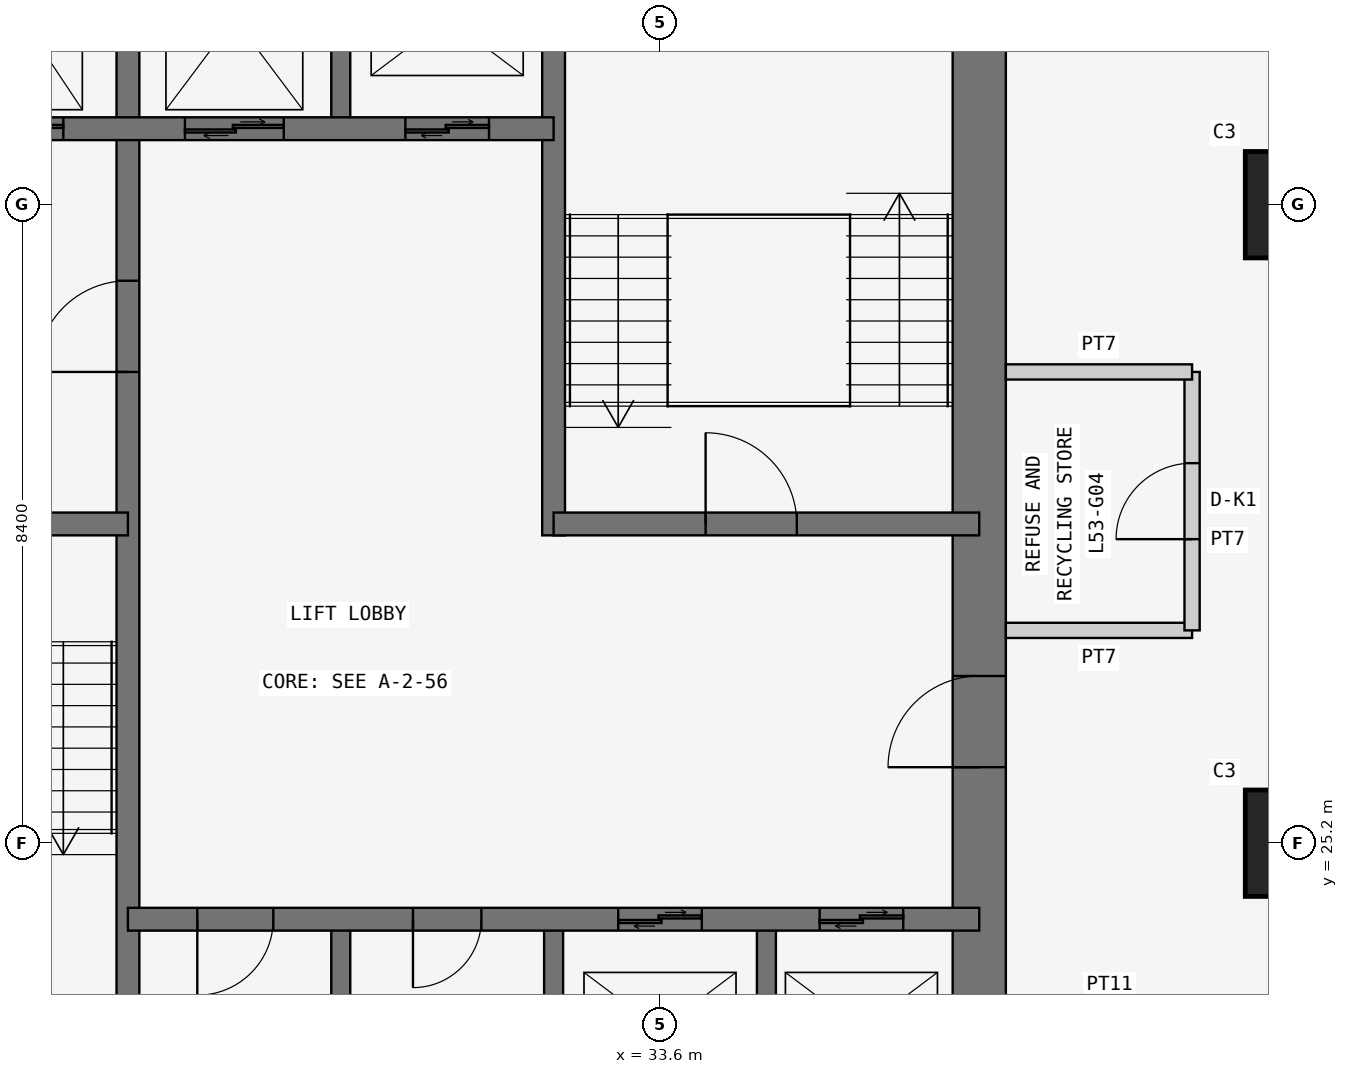
"""IFC4 building model, lengths in metres.
Left out: names, types, materials, properties, quantities, classifications, styles, units other than length and angle.
Written with IfcOpenShell. Run it as: python <this file> out.ifc"""

import sys

from ifc_helpers import new_model, si_unit, direction, frame, frame_2d, origin, origin_2d, place, context, subcontext, project, spatial, rectangle, extrude, element, fill, save


model = new_model("IFC4")
c1 = context("Model", 3, precision=1e-05, world=origin(), true_north=direction((0.0, 1.0)))
c2 = subcontext(c1, "Body", "Model", "MODEL_VIEW")
j1 = project(units=[si_unit("LENGTHUNIT", "METRE"), si_unit("PLANEANGLEUNIT", "RADIAN")], contexts=[c1])
p1 = place(None, origin())
s1 = spatial("IfcSite", under=j1, at=p1, CompositionType="ELEMENT")
p2 = place(p1, origin())
s2 = spatial("IfcBuilding", under=s1, at=p2, CompositionType="ELEMENT")
p3 = place(p2, frame((0.0, 0.0, 204.9)))
s3 = spatial("IfcBuildingStorey", under=s2, at=p3, CompositionType="ELEMENT", Elevation=204.9)
for number, where, z_axis, x_axis in (
    (1, (42.0, 25.2, 0.0), (0.0, 0.0, 1.0), (1.0, 0.0, 0.0)),
    (2, (42.0, 33.6, 0.0), (0.0, 0.0, 1.0), (1.0, 0.0, 0.0)),
):
    element("IfcColumn", number, at=place(p3, frame(where, z_axis=z_axis, x_axis=x_axis)), inside=s3, PredefinedType="COLUMN", context=c2, shape_type="SweptSolid", body=[
        extrude(rectangle(XDim=1.4, YDim=1.4, at=origin_2d()), origin(), (0.0, 0.0, 1.0), 3.6),
    ])
p4 = place(p3, frame((37.8, 21.0, 0.0), z_axis=(0.0, 0.0, 1.0), x_axis=(0.0, 1.0, 0.0)))
e3 = element("IfcWall", 3, at=p4, inside=s3, PredefinedType="SHEAR", context=c2, shape_type="SweptSolid", body=[
    extrude(rectangle(XDim=17.15, YDim=0.7, at=frame_2d((8.575, 0.0))), origin(), (0.0, 0.0, 1.0), 3.6),
])
p5 = place(p4, frame((5.2, 0.0, 0.0)))
e4 = element("IfcOpeningElement", 4, at=p5, cuts=e3, PredefinedType="OPENING", context=c2, shape_type="SweptSolid", body=[
    extrude(rectangle(XDim=1.2, YDim=2.1, at=frame_2d((0.6, 1.05))), frame((0.0, 0.36, 0.0), z_axis=(0.0, -1.0, 0.0), x_axis=(1.0, 0.0, 0.0)), (0.0, 0.0, 1.0), 0.72),
])
p6 = place(p3, frame((26.6, 21.0, 0.0), z_axis=(0.0, 0.0, 1.0), x_axis=(0.0, 1.0, 0.0)))
e5 = element("IfcWall", 5, at=p6, inside=s3, PredefinedType="SHEAR", context=c2, shape_type="SweptSolid", body=[
    extrude(rectangle(XDim=16.8, YDim=0.3, at=frame_2d((8.4, 0.0))), origin(), (0.0, 0.0, 1.0), 3.6),
])
p7 = place(p6, frame((10.4, 0.0, 0.0)))
e6 = element("IfcOpeningElement", 6, at=p7, cuts=e5, PredefinedType="OPENING", context=c2, shape_type="SweptSolid", body=[
    extrude(rectangle(XDim=1.2, YDim=2.1, at=frame_2d((0.6, 1.05))), frame((0.0, 0.16, 0.0), z_axis=(0.0, -1.0, 0.0), x_axis=(1.0, 0.0, 0.0)), (0.0, 0.0, 1.0), 0.32),
])
p8 = place(p3, frame((21.0, 29.4, 0.0), z_axis=(0.0, 0.0, 1.0), x_axis=(1.0, 0.0, 0.0)))
e7 = element("IfcWall", 7, at=p8, inside=s3, PredefinedType="SHEAR", context=c2, shape_type="SweptSolid", body=[
    extrude(rectangle(XDim=5.6, YDim=0.3, at=frame_2d((2.8, 0.0))), origin(), (0.0, 0.0, 1.0), 3.6),
])
p9 = place(p8, frame((2.3, 0.0, 0.0)))
e8 = element("IfcOpeningElement", 8, at=p9, cuts=e7, PredefinedType="OPENING", context=c2, shape_type="SweptSolid", body=[
    extrude(rectangle(XDim=1.2, YDim=2.1, at=frame_2d((0.6, 1.05))), frame((0.0, 0.16, 0.0), z_axis=(0.0, -1.0, 0.0), x_axis=(1.0, 0.0, 0.0)), (0.0, 0.0, 1.0), 0.32),
])
p10 = place(p3, frame((21.0, 34.6, 0.0), z_axis=(0.0, 0.0, 1.0), x_axis=(1.0, 0.0, 0.0)))
e9 = element("IfcWall", 9, at=p10, inside=s3, PredefinedType="SHEAR", context=c2, shape_type="SweptSolid", body=[
    extrude(rectangle(XDim=11.2, YDim=0.3, at=frame_2d((5.6, 0.0))), origin(), (0.0, 0.0, 1.0), 3.6),
])
p11 = place(p10, frame((9.25, 0.0, 0.0)))
e10 = element("IfcOpeningElement", 10, at=p11, cuts=e9, PredefinedType="OPENING", context=c2, shape_type="SweptSolid", body=[
    extrude(rectangle(XDim=1.1, YDim=2.1, at=frame_2d((0.55, 1.05))), frame((0.0, 0.16, 0.0), z_axis=(0.0, -1.0, 0.0), x_axis=(1.0, 0.0, 0.0)), (0.0, 0.0, 1.0), 0.32),
])
p12 = place(p10, frame((1.0, 0.0, 0.0)))
e11 = element("IfcOpeningElement", 11, at=p12, cuts=e9, PredefinedType="OPENING", context=c2, shape_type="SweptSolid", body=[
    extrude(rectangle(XDim=1.1, YDim=2.1, at=frame_2d((0.55, 1.05))), frame((0.0, 0.16, 0.0), z_axis=(0.0, -1.0, 0.0), x_axis=(1.0, 0.0, 0.0)), (0.0, 0.0, 1.0), 0.32),
])
p13 = place(p10, frame((3.65, 0.0, 0.0)))
e12 = element("IfcOpeningElement", 12, at=p13, cuts=e9, PredefinedType="OPENING", context=c2, shape_type="SweptSolid", body=[
    extrude(rectangle(XDim=1.1, YDim=2.1, at=frame_2d((0.55, 1.05))), frame((0.0, 0.16, 0.0), z_axis=(0.0, -1.0, 0.0), x_axis=(1.0, 0.0, 0.0)), (0.0, 0.0, 1.0), 0.32),
])
p14 = place(p10, frame((6.35, 0.0, 0.0)))
e13 = element("IfcOpeningElement", 13, at=p14, cuts=e9, PredefinedType="OPENING", context=c2, shape_type="SweptSolid", body=[
    extrude(rectangle(XDim=1.3, YDim=2.1, at=frame_2d((0.65, 1.05))), frame((0.0, 0.16, 0.0), z_axis=(0.0, -1.0, 0.0), x_axis=(1.0, 0.0, 0.0)), (0.0, 0.0, 1.0), 0.32),
])
p15 = place(p3, frame((26.6, 24.2, 0.0), z_axis=(0.0, 0.0, 1.0), x_axis=(1.0, 0.0, 0.0)))
e14 = element("IfcWall", 14, at=p15, inside=s3, PredefinedType="SHEAR", context=c2, shape_type="SweptSolid", body=[
    extrude(rectangle(XDim=11.2, YDim=0.3, at=frame_2d((5.6, 0.0))), origin(), (0.0, 0.0, 1.0), 3.6),
])
p16 = place(p15, frame((0.913, 0.0, 0.0)))
e15 = element("IfcOpeningElement", 15, at=p16, cuts=e14, PredefinedType="OPENING", context=c2, shape_type="SweptSolid", body=[
    extrude(rectangle(XDim=1.0, YDim=2.1, at=frame_2d((0.5, 1.05))), frame((0.0, 0.16, 0.0), z_axis=(0.0, -1.0, 0.0), x_axis=(1.0, 0.0, 0.0)), (0.0, 0.0, 1.0), 0.32),
])
p17 = place(p15, frame((3.75, 0.0, 0.0)))
e16 = element("IfcOpeningElement", 16, at=p17, cuts=e14, PredefinedType="OPENING", context=c2, shape_type="SweptSolid", body=[
    extrude(rectangle(XDim=0.9, YDim=2.1, at=frame_2d((0.45, 1.05))), frame((0.0, 0.16, 0.0), z_axis=(0.0, -1.0, 0.0), x_axis=(1.0, 0.0, 0.0)), (0.0, 0.0, 1.0), 0.32),
])
p18 = place(p15, frame((6.45, 0.0, 0.0)))
e17 = element("IfcOpeningElement", 17, at=p18, cuts=e14, PredefinedType="OPENING", context=c2, shape_type="SweptSolid", body=[
    extrude(rectangle(XDim=1.1, YDim=2.1, at=frame_2d((0.55, 1.05))), frame((0.0, 0.16, 0.0), z_axis=(0.0, -1.0, 0.0), x_axis=(1.0, 0.0, 0.0)), (0.0, 0.0, 1.0), 0.32),
])
p19 = place(p15, frame((9.1, 0.0, 0.0)))
e18 = element("IfcOpeningElement", 18, at=p19, cuts=e14, PredefinedType="OPENING", context=c2, shape_type="SweptSolid", body=[
    extrude(rectangle(XDim=1.1, YDim=2.1, at=frame_2d((0.55, 1.05))), frame((0.0, 0.16, 0.0), z_axis=(0.0, -1.0, 0.0), x_axis=(1.0, 0.0, 0.0)), (0.0, 0.0, 1.0), 0.32),
])
p20 = place(p3, frame((32.2, 29.25, 0.0), z_axis=(0.0, 0.0, 1.0), x_axis=(0.0, 1.0, 0.0)))
e19 = element("IfcWall", 19, at=p20, inside=s3, PredefinedType="SHEAR", context=c2, shape_type="SweptSolid", body=[
    extrude(rectangle(XDim=8.55, YDim=0.3, at=frame_2d((4.275, 0.0))), origin(), (0.0, 0.0, 1.0), 3.6),
])
p21 = place(p3, frame((32.2, 29.4, 0.0), z_axis=(0.0, 0.0, 1.0), x_axis=(1.0, 0.0, 0.0)))
e20 = element("IfcWall", 20, at=p21, inside=s3, PredefinedType="SHEAR", context=c2, shape_type="SweptSolid", body=[
    extrude(rectangle(XDim=5.6, YDim=0.3, at=frame_2d((2.8, 0.0))), origin(), (0.0, 0.0, 1.0), 3.6),
])
p22 = place(p21, frame((2.0, 0.0, 0.0)))
e21 = element("IfcOpeningElement", 21, at=p22, cuts=e20, PredefinedType="OPENING", context=c2, shape_type="SweptSolid", body=[
    extrude(rectangle(XDim=1.2, YDim=2.1, at=frame_2d((0.6, 1.05))), frame((0.0, 0.16, 0.0), z_axis=(0.0, -1.0, 0.0), x_axis=(1.0, 0.0, 0.0)), (0.0, 0.0, 1.0), 0.32),
])
for number, where, z_axis, x_axis in (
    (22, (29.4, 21.0, 0.0), (0.0, 0.0, 1.0), (0.0, 1.0, 0.0)),
    (23, (32.2, 21.0, 0.0), (0.0, 0.0, 1.0), (0.0, 1.0, 0.0)),
    (24, (35.0, 21.0, 0.0), (0.0, 0.0, 1.0), (0.0, 1.0, 0.0)),
    (25, (29.4, 34.6, 0.0), (0.0, 0.0, 1.0), (0.0, 1.0, 0.0)),
):
    element("IfcWall", number, at=place(p3, frame(where, z_axis=z_axis, x_axis=x_axis)), inside=s3, PredefinedType="SHEAR", context=c2, shape_type="SweptSolid", body=[
        extrude(rectangle(XDim=3.2, YDim=0.25, at=frame_2d((1.6, 0.0))), origin(), (0.0, 0.0, 1.0), 3.6),
    ])
p23 = place(p3, frame((38.15, 28.0, 0.0), z_axis=(0.0, 0.0, 1.0), x_axis=(1.0, 0.0, 0.0)))
e26 = element("IfcWall", 26, at=p23, inside=s3, PredefinedType="PARTITIONING", context=c2, shape_type="SweptSolid", body=[
    extrude(rectangle(XDim=2.45, YDim=0.2, at=frame_2d((1.225, 0.0))), origin(), (0.0, 0.0, 1.0), 3.45),
])
p24 = place(p3, frame((40.6, 28.0, 0.0), z_axis=(0.0, 0.0, 1.0), x_axis=(0.0, 1.0, 0.0)))
e27 = element("IfcWall", 27, at=p24, inside=s3, PredefinedType="PARTITIONING", context=c2, shape_type="SweptSolid", body=[
    extrude(rectangle(XDim=3.4, YDim=0.2, at=frame_2d((1.7, 0.0))), origin(), (0.0, 0.0, 1.0), 3.45),
])
p25 = place(p24, frame((1.2, 0.0, 0.0)))
e28 = element("IfcOpeningElement", 28, at=p25, cuts=e27, PredefinedType="OPENING", context=c2, shape_type="SweptSolid", body=[
    extrude(rectangle(XDim=1.0, YDim=2.1, at=frame_2d((0.5, 1.05))), frame((0.0, 0.11, 0.0), z_axis=(0.0, -1.0, 0.0), x_axis=(1.0, 0.0, 0.0)), (0.0, 0.0, 1.0), 0.22),
])
p26 = place(p3, frame((40.6, 31.4, 0.0), z_axis=(0.0, 0.0, 1.0), x_axis=(-1.0, 0.0, 0.0)))
e29 = element("IfcWall", 29, at=p26, inside=s3, PredefinedType="PARTITIONING", context=c2, shape_type="SweptSolid", body=[
    extrude(rectangle(XDim=2.45, YDim=0.2, at=frame_2d((1.225, 0.0))), origin(), (0.0, 0.0, 1.0), 3.45),
])
p27 = place(p25, origin())
e30 = element("IfcDoor", 30, at=p27, inside=s3, OperationType="SINGLE_SWING_LEFT", PredefinedType="DOOR", context=c2, shape_type="SweptSolid", body=[
    extrude(rectangle(XDim=1.0, YDim=2.1, at=frame_2d((0.5, 1.05))), frame((0.0, 0.025, 0.0), z_axis=(0.0, -1.0, 0.0), x_axis=(1.0, 0.0, 0.0)), (0.0, 0.0, 1.0), 0.05),
])
fill(e28, e30)
p28 = place(p7, origin())
e31 = element("IfcDoor", 31, at=p28, inside=s3, OperationType="SINGLE_SWING_LEFT", PredefinedType="DOOR", context=c2, shape_type="SweptSolid", body=[
    extrude(rectangle(XDim=1.2, YDim=2.1, at=frame_2d((0.6, 1.05))), frame((0.0, 0.025, 0.0), z_axis=(0.0, -1.0, 0.0), x_axis=(1.0, 0.0, 0.0)), (0.0, 0.0, 1.0), 0.05),
])
fill(e6, e31)
p29 = place(p5, origin())
e32 = element("IfcDoor", 32, at=p29, inside=s3, OperationType="SINGLE_SWING_LEFT", PredefinedType="DOOR", context=c2, shape_type="SweptSolid", body=[
    extrude(rectangle(XDim=1.2, YDim=2.1, at=frame_2d((0.6, 1.05))), frame((0.0, 0.025, 0.0), z_axis=(0.0, -1.0, 0.0), x_axis=(1.0, 0.0, 0.0)), (0.0, 0.0, 1.0), 0.05),
])
fill(e4, e32)
p30 = place(p22, origin())
e33 = element("IfcDoor", 33, at=p30, inside=s3, OperationType="SINGLE_SWING_LEFT", PredefinedType="DOOR", context=c2, shape_type="SweptSolid", body=[
    extrude(rectangle(XDim=1.2, YDim=2.1, at=frame_2d((0.6, 1.05))), frame((0.0, 0.025, 0.0), z_axis=(0.0, -1.0, 0.0), x_axis=(1.0, 0.0, 0.0)), (0.0, 0.0, 1.0), 0.05),
])
fill(e21, e33)
p31 = place(p16, frame((1.0, 0.0, 0.0), z_axis=(0.0, 0.0, 1.0), x_axis=(-1.0, 0.0, 0.0)))
e34 = element("IfcDoor", 34, at=p31, inside=s3, OperationType="SINGLE_SWING_RIGHT", PredefinedType="DOOR", context=c2, shape_type="SweptSolid", body=[
    extrude(rectangle(XDim=1.0, YDim=2.1, at=frame_2d((0.5, 1.05))), frame((0.0, 0.025, 0.0), z_axis=(0.0, -1.0, 0.0), x_axis=(1.0, 0.0, 0.0)), (0.0, 0.0, 1.0), 0.05),
])
fill(e15, e34)
p32 = place(p17, frame((0.9, 0.0, 0.0), z_axis=(0.0, 0.0, 1.0), x_axis=(-1.0, 0.0, 0.0)))
e35 = element("IfcDoor", 35, at=p32, inside=s3, OperationType="SINGLE_SWING_RIGHT", PredefinedType="DOOR", context=c2, shape_type="SweptSolid", body=[
    extrude(rectangle(XDim=0.9, YDim=2.1, at=frame_2d((0.45, 1.05))), frame((0.0, 0.025, 0.0), z_axis=(0.0, -1.0, 0.0), x_axis=(1.0, 0.0, 0.0)), (0.0, 0.0, 1.0), 0.05),
])
fill(e16, e35)
p33 = place(p18, origin())
e36 = element("IfcDoor", 36, at=p33, inside=s3, OperationType="DOUBLE_DOOR_SLIDING", PredefinedType="DOOR", context=c2, shape_type="SweptSolid", body=[
    extrude(rectangle(XDim=1.1, YDim=2.1, at=frame_2d((0.55, 1.05))), frame((0.0, 0.025, 0.0), z_axis=(0.0, -1.0, 0.0), x_axis=(1.0, 0.0, 0.0)), (0.0, 0.0, 1.0), 0.05),
])
fill(e17, e36)
p34 = place(p19, origin())
e37 = element("IfcDoor", 37, at=p34, inside=s3, OperationType="DOUBLE_DOOR_SLIDING", PredefinedType="DOOR", context=c2, shape_type="SweptSolid", body=[
    extrude(rectangle(XDim=1.1, YDim=2.1, at=frame_2d((0.55, 1.05))), frame((0.0, 0.025, 0.0), z_axis=(0.0, -1.0, 0.0), x_axis=(1.0, 0.0, 0.0)), (0.0, 0.0, 1.0), 0.05),
])
fill(e18, e37)
p35 = place(p11, origin())
e38 = element("IfcDoor", 38, at=p35, inside=s3, OperationType="DOUBLE_DOOR_SLIDING", PredefinedType="DOOR", context=c2, shape_type="SweptSolid", body=[
    extrude(rectangle(XDim=1.1, YDim=2.1, at=frame_2d((0.55, 1.05))), frame((0.0, 0.025, 0.0), z_axis=(0.0, -1.0, 0.0), x_axis=(1.0, 0.0, 0.0)), (0.0, 0.0, 1.0), 0.05),
])
fill(e10, e38)
p36 = place(p13, origin())
e39 = element("IfcDoor", 39, at=p36, inside=s3, OperationType="DOUBLE_DOOR_SLIDING", PredefinedType="DOOR", context=c2, shape_type="SweptSolid", body=[
    extrude(rectangle(XDim=1.1, YDim=2.1, at=frame_2d((0.55, 1.05))), frame((0.0, 0.025, 0.0), z_axis=(0.0, -1.0, 0.0), x_axis=(1.0, 0.0, 0.0)), (0.0, 0.0, 1.0), 0.05),
])
fill(e12, e39)
p37 = place(p14, origin())
e40 = element("IfcDoor", 40, at=p37, inside=s3, OperationType="DOUBLE_DOOR_SLIDING", PredefinedType="DOOR", context=c2, shape_type="SweptSolid", body=[
    extrude(rectangle(XDim=1.3, YDim=2.1, at=frame_2d((0.65, 1.05))), frame((0.0, 0.025, 0.0), z_axis=(0.0, -1.0, 0.0), x_axis=(1.0, 0.0, 0.0)), (0.0, 0.0, 1.0), 0.05),
])
fill(e13, e40)
save(model, sys.argv[1])
